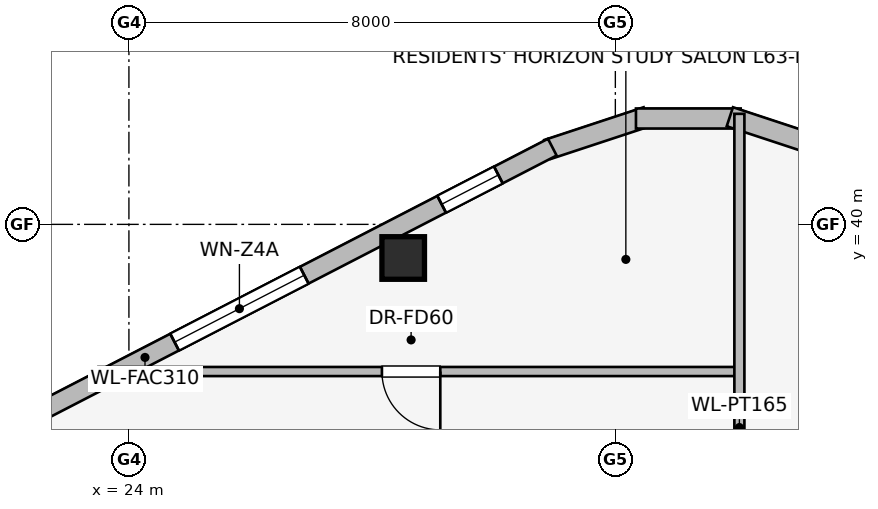
"""IFC4 building model, lengths in metres.
Left out: names, types, materials, properties, quantities, classifications, styles, units other than length and angle.
Written with IfcOpenShell. Run it as: python <this file> out.ifc"""

import sys

from ifc_helpers import new_model, si_unit, direction, frame, frame_2d, origin, origin_2d, place, context, subcontext, project, spatial, rectangle, extrude, element, fill, save


model = new_model("IFC4")
c1 = context("Model", 3, precision=1e-05, world=origin(), true_north=direction((0.0, 1.0)))
c2 = subcontext(c1, "Body", "Model", "MODEL_VIEW")
j1 = project(units=[si_unit("LENGTHUNIT", "METRE"), si_unit("PLANEANGLEUNIT", "RADIAN")], contexts=[c1])
p1 = place(None, origin())
s1 = spatial("IfcSite", under=j1, at=p1, CompositionType="ELEMENT")
p2 = place(p1, origin())
s2 = spatial("IfcBuilding", under=s1, at=p2, CompositionType="ELEMENT")
p3 = place(p2, frame((0.0, 0.0, 231.25)))
s3 = spatial("IfcBuildingStorey", under=s2, at=p3, CompositionType="ELEMENT", Elevation=231.25)
p4 = place(p3, frame((28.511, 39.447, 0.0), z_axis=(0.0, 0.0, 1.0), x_axis=(1.0, 0.0, 0.0)))
e1 = element("IfcColumn", 1, at=p4, inside=s3, PredefinedType="COLUMN", context=c2, shape_type="SweptSolid", body=[
    extrude(rectangle(XDim=0.7, YDim=0.7, at=origin_2d()), origin(), (0.0, 0.0, 1.0), 3.55),
])
p5 = place(p3, frame((30.882, 41.231, 0.0), z_axis=(0.0, 0.0, 1.0), x_axis=(0.949713440491, 0.313120393699, 0.0)))
e2 = element("IfcWall", 2, at=p5, inside=s3, PredefinedType="STANDARD", context=c2, shape_type="SweptSolid", body=[
    extrude(rectangle(XDim=1.722, YDim=0.33, at=frame_2d((0.861, 0.0))), origin(), (0.0, 0.0, 1.0), 3.26),
])
p6 = place(p3, frame((32.339, 41.741, 0.0), z_axis=(0.0, 0.0, 1.0), x_axis=(1.0, 0.0, 0.0)))
e3 = element("IfcWall", 3, at=p6, inside=s3, PredefinedType="STANDARD", context=c2, shape_type="SweptSolid", body=[
    extrude(rectangle(XDim=1.722, YDim=0.33, at=frame_2d((0.861, 0.0))), origin(), (0.0, 0.0, 1.0), 3.26),
])
p7 = place(p3, frame((33.883, 41.77, 0.0), z_axis=(0.0, 0.0, 1.0), x_axis=(0.949713440491, -0.313120393699, 0.0)))
e4 = element("IfcWall", 4, at=p7, inside=s3, PredefinedType="STANDARD", context=c2, shape_type="SweptSolid", body=[
    extrude(rectangle(XDim=1.722, YDim=0.33, at=frame_2d((0.861, 0.0))), origin(), (0.0, 0.0, 1.0), 3.26),
])
p8 = place(p3, frame((17.566, 34.354, 0.0), z_axis=(0.0, 0.0, 1.0), x_axis=(0.888581481622, 0.458718814218, 0.0)))
e5 = element("IfcWall", 5, at=p8, inside=s3, PredefinedType="STANDARD", context=c2, shape_type="SweptSolid", body=[
    extrude(rectangle(XDim=15.077, YDim=0.31, at=frame_2d((7.539, 0.0))), origin(), (0.0, 0.0, 1.0), 3.26),
])
p9 = place(p8, frame((0.998, 0.0, 0.75)))
e6 = element("IfcOpeningElement", 6, at=p9, cuts=e5, PredefinedType="OPENING", context=c2, shape_type="SweptSolid", body=[
    extrude(rectangle(XDim=1.05, YDim=1.4, at=frame_2d((0.525, 0.7))), frame((0.0, 0.165, 0.0), z_axis=(0.0, -1.0, 0.0), x_axis=(1.0, 0.0, 0.0)), (0.0, 0.0, 1.0), 0.33),
])
p10 = place(p8, frame((4.403, 0.0, 0.75)))
e7 = element("IfcOpeningElement", 7, at=p10, cuts=e5, PredefinedType="OPENING", context=c2, shape_type="SweptSolid", body=[
    extrude(rectangle(XDim=1.05, YDim=1.4, at=frame_2d((0.525, 0.7))), frame((0.0, 0.165, 0.0), z_axis=(0.0, -1.0, 0.0), x_axis=(1.0, 0.0, 0.0)), (0.0, 0.0, 1.0), 0.33),
])
p11 = place(p8, frame((8.086, 0.0, 0.75)))
e8 = element("IfcOpeningElement", 8, at=p11, cuts=e5, PredefinedType="OPENING", context=c2, shape_type="SweptSolid", body=[
    extrude(rectangle(XDim=2.4, YDim=1.6, at=frame_2d((1.2, 0.8))), frame((0.0, 0.165, 0.0), z_axis=(0.0, -1.0, 0.0), x_axis=(1.0, 0.0, 0.0)), (0.0, 0.0, 1.0), 0.33),
])
p12 = place(p8, frame((13.029, 0.0, 0.75)))
e9 = element("IfcOpeningElement", 9, at=p12, cuts=e5, PredefinedType="OPENING", context=c2, shape_type="SweptSolid", body=[
    extrude(rectangle(XDim=1.05, YDim=1.4, at=frame_2d((0.525, 0.7))), frame((0.0, 0.165, 0.0), z_axis=(0.0, -1.0, 0.0), x_axis=(1.0, 0.0, 0.0)), (0.0, 0.0, 1.0), 0.33),
])
p13 = place(p3, frame((34.0, 37.58, 0.0), z_axis=(0.0, 0.0, 1.0), x_axis=(-1.0, 0.0, 0.0)))
e10 = element("IfcWall", 10, at=p13, inside=s3, PredefinedType="PARTITIONING", context=c2, shape_type="SweptSolid", body=[
    extrude(rectangle(XDim=10.501, YDim=0.15, at=frame_2d((5.25, 0.0))), origin(), (0.0, 0.0, 1.0), 2.652),
])
p14 = place(p13, frame((4.879, 0.0, 0.0)))
e11 = element("IfcOpeningElement", 11, at=p14, cuts=e10, PredefinedType="OPENING", context=c2, shape_type="SweptSolid", body=[
    extrude(rectangle(XDim=0.96, YDim=2.0, at=frame_2d((0.48, 1.0))), frame((0.0, 0.085, 0.0), z_axis=(0.0, -1.0, 0.0), x_axis=(1.0, 0.0, 0.0)), (0.0, 0.0, 1.0), 0.17),
])
p15 = place(p3, frame((34.04, 31.5, 0.0), z_axis=(0.0, 0.0, 1.0), x_axis=(0.0, 1.0, 0.0)))
e12 = element("IfcWall", 12, at=p15, inside=s3, PredefinedType="PARTITIONING", context=c2, shape_type="SweptSolid", body=[
    extrude(rectangle(XDim=10.318, YDim=0.165, at=frame_2d((5.159, 0.0))), origin(), (0.0, 0.0, 1.0), 3.26),
])
p16 = place(p11, origin())
e13 = element("IfcWindow", 13, at=p16, inside=s3, PartitioningType="SINGLE_PANEL", PredefinedType="WINDOW", context=c2, shape_type="SweptSolid", body=[
    extrude(rectangle(XDim=2.4, YDim=1.6, at=frame_2d((1.2, 0.8))), frame((0.0, 0.03, 0.0), z_axis=(0.0, -1.0, 0.0), x_axis=(1.0, 0.0, 0.0)), (0.0, 0.0, 1.0), 0.06),
])
fill(e8, e13)
p17 = place(p12, origin())
e14 = element("IfcWindow", 14, at=p17, inside=s3, PartitioningType="SINGLE_PANEL", PredefinedType="WINDOW", context=c2, shape_type="SweptSolid", body=[
    extrude(rectangle(XDim=1.05, YDim=1.4, at=frame_2d((0.525, 0.7))), frame((0.0, 0.03, 0.0), z_axis=(0.0, -1.0, 0.0), x_axis=(1.0, 0.0, 0.0)), (0.0, 0.0, 1.0), 0.06),
])
fill(e9, e14)
p18 = place(p14, origin())
e15 = element("IfcDoor", 15, at=p18, inside=s3, OperationType="SINGLE_SWING_LEFT", PredefinedType="DOOR", context=c2, shape_type="SweptSolid", body=[
    extrude(rectangle(XDim=0.96, YDim=2.0, at=frame_2d((0.48, 1.0))), frame((0.0, 0.025, 0.0), z_axis=(0.0, -1.0, 0.0), x_axis=(1.0, 0.0, 0.0)), (0.0, 0.0, 1.0), 0.05),
])
fill(e11, e15)
save(model, sys.argv[1])
